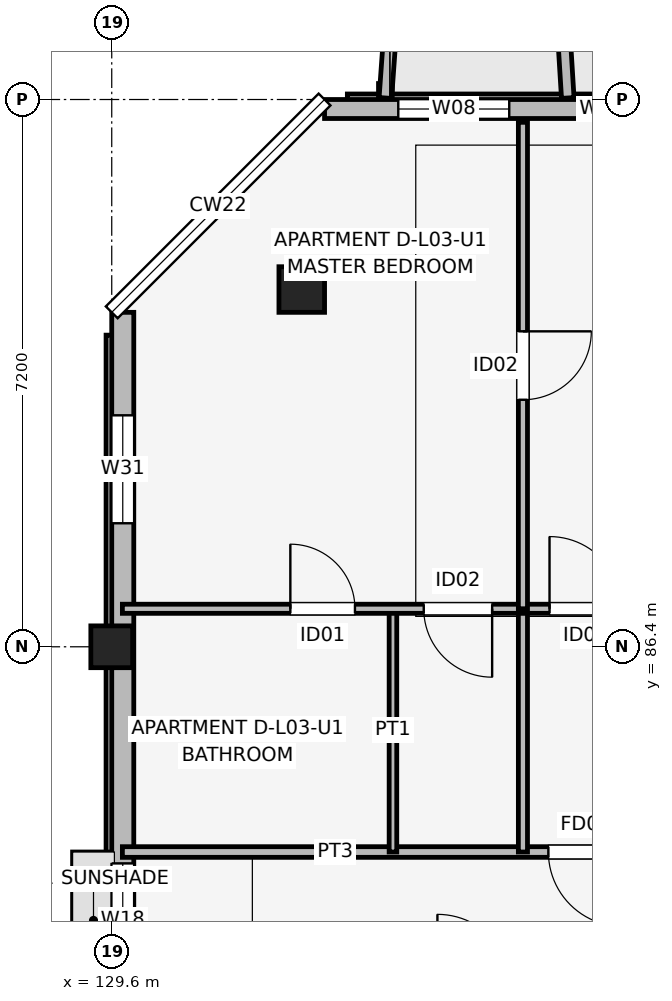
"""IFC4 building model, lengths in metres.
Left out: names, types, materials, properties, quantities, classifications, styles, units other than length and angle.
Written with IfcOpenShell. Run it as: python <this file> out.ifc"""

import sys

from ifc_helpers import new_model, si_unit, direction, frame, frame_2d, origin, origin_2d, place, context, subcontext, project, spatial, rectangle, extrude, element, fill, save


model = new_model("IFC4")
c1 = context("Model", 3, precision=1e-05, world=origin(), true_north=direction((0.0, 1.0)))
c2 = subcontext(c1, "Body", "Model", "MODEL_VIEW")
j1 = project(units=[si_unit("LENGTHUNIT", "METRE"), si_unit("PLANEANGLEUNIT", "RADIAN")], contexts=[c1])
p1 = place(None, origin())
s1 = spatial("IfcSite", under=j1, at=p1, CompositionType="ELEMENT")
p2 = place(p1, origin())
s2 = spatial("IfcBuilding", under=s1, at=p2, CompositionType="ELEMENT")
p3 = place(p2, frame((0.0, 0.0, 11.85)))
s3 = spatial("IfcBuildingStorey", under=s2, at=p3, CompositionType="ELEMENT", Elevation=11.85)
p4 = place(p3, frame((129.6, 86.4, 0.0), z_axis=(0.0, 0.0, 1.0), x_axis=(1.0, 0.0, 0.0)))
e1 = element("IfcColumn", 1, at=p4, inside=s3, PredefinedType="COLUMN", context=c2, shape_type="SweptSolid", body=[
    extrude(rectangle(XDim=0.55, YDim=0.55, at=origin_2d()), origin(), (0.0, 0.0, 1.0), 3.15),
])
p5 = place(p3, frame((132.1, 91.1, 0.0), z_axis=(0.0, 0.0, 1.0), x_axis=(1.0, 0.0, 0.0)))
e2 = element("IfcColumn", 2, at=p5, inside=s3, PredefinedType="COLUMN", context=c2, shape_type="SweptSolid", body=[
    extrude(rectangle(XDim=0.6, YDim=0.6, at=origin_2d()), origin(), (0.0, 0.0, 1.0), 3.15),
])
p6 = place(p3, frame((162.8, 93.475, 0.0), z_axis=(0.0, 0.0, 1.0), x_axis=(-1.0, 0.0, 0.0)))
e3 = element("IfcWall", 3, at=p6, inside=s3, PredefinedType="SOLIDWALL", context=c2, shape_type="SweptSolid", body=[
    extrude(rectangle(XDim=30.4, YDim=0.25, at=frame_2d((15.2, 0.0))), origin(), (0.0, 0.0, 1.0), 2.43),
])
p7 = place(p6, frame((22.1, 0.0, 0.0), z_axis=(0.0, 0.0, 1.0), x_axis=(-1.0, 0.0, 0.0)))
e4 = element("IfcOpeningElement", 4, at=p7, cuts=e3, PredefinedType="OPENING", context=c2, shape_type="SweptSolid", body=[
    extrude(rectangle(XDim=1.8, YDim=2.15, at=frame_2d((0.9, 1.075))), frame((0.0, 0.135, 0.0), z_axis=(0.0, -1.0, 0.0), x_axis=(1.0, 0.0, 0.0)), (0.0, 0.0, 1.0), 0.27),
])
p8 = place(p6, frame((7.625, 0.0, 0.0), z_axis=(0.0, 0.0, 1.0), x_axis=(-1.0, 0.0, 0.0)))
e5 = element("IfcOpeningElement", 5, at=p8, cuts=e3, PredefinedType="OPENING", context=c2, shape_type="SweptSolid", body=[
    extrude(rectangle(XDim=1.65, YDim=2.15, at=frame_2d((0.825, 1.075))), frame((0.0, 0.135, 0.0), z_axis=(0.0, -1.0, 0.0), x_axis=(1.0, 0.0, 0.0)), (0.0, 0.0, 1.0), 0.27),
])
p9 = place(p6, frame((27.97, 0.0, 0.7)))
e6 = element("IfcOpeningElement", 6, at=p9, cuts=e3, PredefinedType="OPENING", context=c2, shape_type="SweptSolid", body=[
    extrude(rectangle(XDim=1.46, YDim=1.55, at=frame_2d((0.73, 0.775))), frame((0.0, 0.135, 0.0), z_axis=(0.0, -1.0, 0.0), x_axis=(1.0, 0.0, 0.0)), (0.0, 0.0, 1.0), 0.27),
])
p10 = place(p6, frame((26.458, 0.0, 0.75)))
e7 = element("IfcOpeningElement", 7, at=p10, cuts=e3, PredefinedType="OPENING", context=c2, shape_type="SweptSolid", body=[
    extrude(rectangle(XDim=0.6, YDim=1.25, at=frame_2d((0.3, 0.625))), frame((0.0, 0.135, 0.0), z_axis=(0.0, -1.0, 0.0), x_axis=(1.0, 0.0, 0.0)), (0.0, 0.0, 1.0), 0.27),
])
p11 = place(p6, frame((24.942, 0.0, 0.75)))
e8 = element("IfcOpeningElement", 8, at=p11, cuts=e3, PredefinedType="OPENING", context=c2, shape_type="SweptSolid", body=[
    extrude(rectangle(XDim=0.6, YDim=1.25, at=frame_2d((0.3, 0.625))), frame((0.0, 0.135, 0.0), z_axis=(0.0, -1.0, 0.0), x_axis=(1.0, 0.0, 0.0)), (0.0, 0.0, 1.0), 0.27),
])
p12 = place(p6, frame((15.54, 0.0, 0.7)))
e9 = element("IfcOpeningElement", 9, at=p12, cuts=e3, PredefinedType="OPENING", context=c2, shape_type="SweptSolid", body=[
    extrude(rectangle(XDim=1.72, YDim=1.6, at=frame_2d((0.86, 0.8))), frame((0.0, 0.135, 0.0), z_axis=(0.0, -1.0, 0.0), x_axis=(1.0, 0.0, 0.0)), (0.0, 0.0, 1.0), 0.27),
])
p13 = place(p6, frame((13.465, 0.0, 0.75)))
e10 = element("IfcOpeningElement", 10, at=p13, cuts=e3, PredefinedType="OPENING", context=c2, shape_type="SweptSolid", body=[
    extrude(rectangle(XDim=0.72, YDim=1.35, at=frame_2d((0.36, 0.675))), frame((0.0, 0.135, 0.0), z_axis=(0.0, -1.0, 0.0), x_axis=(1.0, 0.0, 0.0)), (0.0, 0.0, 1.0), 0.27),
])
p14 = place(p6, frame((10.542, 0.0, 0.75)))
e11 = element("IfcOpeningElement", 11, at=p14, cuts=e3, PredefinedType="OPENING", context=c2, shape_type="SweptSolid", body=[
    extrude(rectangle(XDim=0.6, YDim=1.25, at=frame_2d((0.3, 0.625))), frame((0.0, 0.135, 0.0), z_axis=(0.0, -1.0, 0.0), x_axis=(1.0, 0.0, 0.0)), (0.0, 0.0, 1.0), 0.27),
])
p15 = place(p6, frame((3.343, 0.0, 0.75)))
e12 = element("IfcOpeningElement", 12, at=p15, cuts=e3, PredefinedType="OPENING", context=c2, shape_type="SweptSolid", body=[
    extrude(rectangle(XDim=0.6, YDim=1.25, at=frame_2d((0.3, 0.625))), frame((0.0, 0.135, 0.0), z_axis=(0.0, -1.0, 0.0), x_axis=(1.0, 0.0, 0.0)), (0.0, 0.0, 1.0), 0.27),
])
p16 = place(p6, frame((1.02, 0.0, 0.75)))
e13 = element("IfcOpeningElement", 13, at=p16, cuts=e3, PredefinedType="OPENING", context=c2, shape_type="SweptSolid", body=[
    extrude(rectangle(XDim=1.1, YDim=1.5, at=frame_2d((0.55, 0.75))), frame((0.0, 0.135, 0.0), z_axis=(0.0, -1.0, 0.0), x_axis=(1.0, 0.0, 0.0)), (0.0, 0.0, 1.0), 0.27),
])
p17 = place(p3, frame((129.745, 90.8, 0.0), z_axis=(0.0, 0.0, 1.0), x_axis=(0.0, -1.0, 0.0)))
e14 = element("IfcWall", 14, at=p17, inside=s3, PredefinedType="SOLIDWALL", context=c2, shape_type="SweptSolid", body=[
    extrude(rectangle(XDim=16.0, YDim=0.29, at=frame_2d((8.0, 0.0))), origin(), (0.0, 0.0, 1.0), 2.38),
])
p18 = place(p17, frame((7.25, 0.0, 1.05)))
e15 = element("IfcOpeningElement", 15, at=p18, cuts=e14, PredefinedType="OPENING", context=c2, shape_type="SweptSolid", body=[
    extrude(rectangle(XDim=1.5, YDim=1.15, at=frame_2d((0.75, 0.575))), frame((0.0, 0.155, 0.0), z_axis=(0.0, -1.0, 0.0), x_axis=(1.0, 0.0, 0.0)), (0.0, 0.0, 1.0), 0.31),
])
p19 = place(p17, frame((1.355, 0.0, 0.67)))
e16 = element("IfcOpeningElement", 16, at=p19, cuts=e14, PredefinedType="OPENING", context=c2, shape_type="SweptSolid", body=[
    extrude(rectangle(XDim=1.42, YDim=1.6, at=frame_2d((0.71, 0.8))), frame((0.0, 0.155, 0.0), z_axis=(0.0, -1.0, 0.0), x_axis=(1.0, 0.0, 0.0)), (0.0, 0.0, 1.0), 0.31),
])
p20 = place(p3, frame((133.2, 93.62, 0.0), z_axis=(0.0, 0.0, 1.0), x_axis=(0.071317687608, 0.997453651772, 0.0)))
e17 = element("IfcWall", 17, at=p20, inside=s3, PredefinedType="ELEMENTEDWALL", context=c2, shape_type="SweptSolid", body=[
    extrude(rectangle(XDim=1.965, YDim=0.165, at=frame_2d((0.982, 0.0))), origin(), (0.0, 0.0, 1.0), 2.95),
])
p21 = place(p3, frame((135.6, 93.62, 0.0), z_axis=(0.0, 0.0, 1.0), x_axis=(-0.061170732449, 0.998127317276, 0.0)))
e18 = element("IfcWall", 18, at=p21, inside=s3, PredefinedType="ELEMENTEDWALL", context=c2, shape_type="SweptSolid", body=[
    extrude(rectangle(XDim=1.964, YDim=0.165, at=frame_2d((0.982, 0.0))), origin(), (0.0, 0.0, 1.0), 2.95),
])
p22 = place(p3, frame((129.74, 83.7, 0.0), z_axis=(0.0, 0.0, 1.0), x_axis=(1.0, 0.0, 0.0)))
e19 = element("IfcWall", 19, at=p22, inside=s3, PredefinedType="PARTITIONING", context=c2, shape_type="SweptSolid", body=[
    extrude(rectangle(XDim=6.92, YDim=0.14, at=frame_2d((3.46, 0.0))), origin(), (0.0, 0.0, 1.0), 2.38),
])
p23 = place(p22, frame((6.585, 0.0, 0.0), z_axis=(0.0, 0.0, 1.0), x_axis=(-1.0, 0.0, 0.0)))
e20 = element("IfcOpeningElement", 20, at=p23, cuts=e19, PredefinedType="OPENING", context=c2, shape_type="SweptSolid", body=[
    extrude(rectangle(XDim=0.98, YDim=2.1, at=frame_2d((0.49, 1.05))), frame((0.0, 0.08, 0.0), z_axis=(0.0, -1.0, 0.0), x_axis=(1.0, 0.0, 0.0)), (0.0, 0.0, 1.0), 0.16),
])
p24 = place(p3, frame((133.3, 83.7, 0.0), z_axis=(0.0, 0.0, 1.0), x_axis=(0.0, 1.0, 0.0)))
e21 = element("IfcWall", 21, at=p24, inside=s3, PredefinedType="PARTITIONING", context=c2, shape_type="SweptSolid", body=[
    extrude(rectangle(XDim=3.2, YDim=0.1, at=frame_2d((1.6, 0.0))), origin(), (0.0, 0.0, 1.0), 2.375),
])
p25 = place(p3, frame((135.01, 83.7, 0.0), z_axis=(0.0, 0.0, 1.0), x_axis=(0.0, 1.0, 0.0)))
e22 = element("IfcWall", 22, at=p25, inside=s3, PredefinedType="PARTITIONING", context=c2, shape_type="SweptSolid", body=[
    extrude(rectangle(XDim=3.2, YDim=0.12, at=frame_2d((1.6, 0.0))), origin(), (0.0, 0.0, 1.0), 2.375),
])
p26 = place(p3, frame((129.74, 86.9, 0.0), z_axis=(0.0, 0.0, 1.0), x_axis=(1.0, 0.0, 0.0)))
e23 = element("IfcWall", 23, at=p26, inside=s3, PredefinedType="PARTITIONING", context=c2, shape_type="SweptSolid", body=[
    extrude(rectangle(XDim=6.92, YDim=0.12, at=frame_2d((3.46, 0.0))), origin(), (0.0, 0.0, 1.0), 2.38),
])
p27 = place(p26, frame((2.21, 0.0, 0.0)))
e24 = element("IfcOpeningElement", 24, at=p27, cuts=e23, PredefinedType="OPENING", context=c2, shape_type="SweptSolid", body=[
    extrude(rectangle(XDim=0.85, YDim=2.08, at=frame_2d((0.425, 1.04))), frame((0.0, 0.07, 0.0), z_axis=(0.0, -1.0, 0.0), x_axis=(1.0, 0.0, 0.0)), (0.0, 0.0, 1.0), 0.14),
])
p28 = place(p26, frame((4.865, 0.0, 0.0), z_axis=(0.0, 0.0, 1.0), x_axis=(-1.0, 0.0, 0.0)))
e25 = element("IfcOpeningElement", 25, at=p28, cuts=e23, PredefinedType="OPENING", context=c2, shape_type="SweptSolid", body=[
    extrude(rectangle(XDim=0.9, YDim=2.08, at=frame_2d((0.45, 1.04))), frame((0.0, 0.07, 0.0), z_axis=(0.0, -1.0, 0.0), x_axis=(1.0, 0.0, 0.0)), (0.0, 0.0, 1.0), 0.14),
])
p29 = place(p26, frame((5.62, 0.0, 0.0)))
e26 = element("IfcOpeningElement", 26, at=p29, cuts=e23, PredefinedType="OPENING", context=c2, shape_type="SweptSolid", body=[
    extrude(rectangle(XDim=0.95, YDim=2.08, at=frame_2d((0.475, 1.04))), frame((0.0, 0.07, 0.0), z_axis=(0.0, -1.0, 0.0), x_axis=(1.0, 0.0, 0.0)), (0.0, 0.0, 1.0), 0.14),
])
p30 = place(p3, frame((135.01, 86.9, 0.0), z_axis=(0.0, 0.0, 1.0), x_axis=(0.0, 1.0, 0.0)))
e27 = element("IfcWall", 27, at=p30, inside=s3, PredefinedType="PARTITIONING", context=c2, shape_type="SweptSolid", body=[
    extrude(rectangle(XDim=6.4, YDim=0.12, at=frame_2d((3.2, 0.0))), origin(), (0.0, 0.0, 1.0), 2.38),
])
p31 = place(p30, frame((3.65, 0.0, 0.0), z_axis=(0.0, 0.0, 1.0), x_axis=(-1.0, 0.0, 0.0)))
e28 = element("IfcOpeningElement", 28, at=p31, cuts=e27, PredefinedType="OPENING", context=c2, shape_type="SweptSolid", body=[
    extrude(rectangle(XDim=0.9, YDim=2.08, at=frame_2d((0.45, 1.04))), frame((0.0, 0.07, 0.0), z_axis=(0.0, -1.0, 0.0), x_axis=(1.0, 0.0, 0.0)), (0.0, 0.0, 1.0), 0.14),
])
p32 = place(p9, origin())
e29 = element("IfcWindow", 29, at=p32, inside=s3, PartitioningType="SINGLE_PANEL", PredefinedType="WINDOW", context=c2, shape_type="SweptSolid", body=[
    extrude(rectangle(XDim=1.46, YDim=1.55, at=frame_2d((0.73, 0.775))), frame((0.0, 0.03, 0.0), z_axis=(0.0, -1.0, 0.0), x_axis=(1.0, 0.0, 0.0)), (0.0, 0.0, 1.0), 0.06),
])
fill(e6, e29)
p33 = place(p10, origin())
e30 = element("IfcWindow", 30, at=p33, inside=s3, PartitioningType="SINGLE_PANEL", PredefinedType="WINDOW", context=c2, shape_type="SweptSolid", body=[
    extrude(rectangle(XDim=0.6, YDim=1.25, at=frame_2d((0.3, 0.625))), frame((0.0, 0.03, 0.0), z_axis=(0.0, -1.0, 0.0), x_axis=(1.0, 0.0, 0.0)), (0.0, 0.0, 1.0), 0.06),
])
fill(e7, e30)
p34 = place(p18, origin())
e31 = element("IfcWindow", 31, at=p34, inside=s3, PartitioningType="SINGLE_PANEL", PredefinedType="WINDOW", context=c2, shape_type="SweptSolid", body=[
    extrude(rectangle(XDim=1.5, YDim=1.15, at=frame_2d((0.75, 0.575))), frame((0.0, 0.03, 0.0), z_axis=(0.0, -1.0, 0.0), x_axis=(1.0, 0.0, 0.0)), (0.0, 0.0, 1.0), 0.06),
])
fill(e15, e31)
p35 = place(p19, origin())
e32 = element("IfcWindow", 32, at=p35, inside=s3, PartitioningType="SINGLE_PANEL", PredefinedType="WINDOW", context=c2, shape_type="SweptSolid", body=[
    extrude(rectangle(XDim=1.42, YDim=1.6, at=frame_2d((0.71, 0.8))), frame((0.0, 0.03, 0.0), z_axis=(0.0, -1.0, 0.0), x_axis=(1.0, 0.0, 0.0)), (0.0, 0.0, 1.0), 0.06),
])
fill(e16, e32)
p36 = place(p23, origin())
e33 = element("IfcDoor", 33, at=p36, inside=s3, OperationType="SINGLE_SWING_RIGHT", PredefinedType="DOOR", context=c2, shape_type="SweptSolid", body=[
    extrude(rectangle(XDim=0.98, YDim=2.1, at=frame_2d((0.49, 1.05))), frame((0.0, 0.025, 0.0), z_axis=(0.0, -1.0, 0.0), x_axis=(1.0, 0.0, 0.0)), (0.0, 0.0, 1.0), 0.05),
])
fill(e20, e33)
p37 = place(p27, origin())
e34 = element("IfcDoor", 34, at=p37, inside=s3, OperationType="SINGLE_SWING_LEFT", PredefinedType="DOOR", context=c2, shape_type="SweptSolid", body=[
    extrude(rectangle(XDim=0.85, YDim=2.08, at=frame_2d((0.425, 1.04))), frame((0.0, 0.025, 0.0), z_axis=(0.0, -1.0, 0.0), x_axis=(1.0, 0.0, 0.0)), (0.0, 0.0, 1.0), 0.05),
])
fill(e24, e34)
p38 = place(p28, origin())
e35 = element("IfcDoor", 35, at=p38, inside=s3, OperationType="SINGLE_SWING_RIGHT", PredefinedType="DOOR", context=c2, shape_type="SweptSolid", body=[
    extrude(rectangle(XDim=0.9, YDim=2.08, at=frame_2d((0.45, 1.04))), frame((0.0, 0.025, 0.0), z_axis=(0.0, -1.0, 0.0), x_axis=(1.0, 0.0, 0.0)), (0.0, 0.0, 1.0), 0.05),
])
fill(e25, e35)
p39 = place(p29, origin())
e36 = element("IfcDoor", 36, at=p39, inside=s3, OperationType="SINGLE_SWING_LEFT", PredefinedType="DOOR", context=c2, shape_type="SweptSolid", body=[
    extrude(rectangle(XDim=0.95, YDim=2.08, at=frame_2d((0.475, 1.04))), frame((0.0, 0.025, 0.0), z_axis=(0.0, -1.0, 0.0), x_axis=(1.0, 0.0, 0.0)), (0.0, 0.0, 1.0), 0.05),
])
fill(e26, e36)
p40 = place(p31, origin())
e37 = element("IfcDoor", 37, at=p40, inside=s3, OperationType="SINGLE_SWING_RIGHT", PredefinedType="DOOR", context=c2, shape_type="SweptSolid", body=[
    extrude(rectangle(XDim=0.9, YDim=2.08, at=frame_2d((0.45, 1.04))), frame((0.0, 0.025, 0.0), z_axis=(0.0, -1.0, 0.0), x_axis=(1.0, 0.0, 0.0)), (0.0, 0.0, 1.0), 0.05),
])
fill(e28, e37)
save(model, sys.argv[1])
